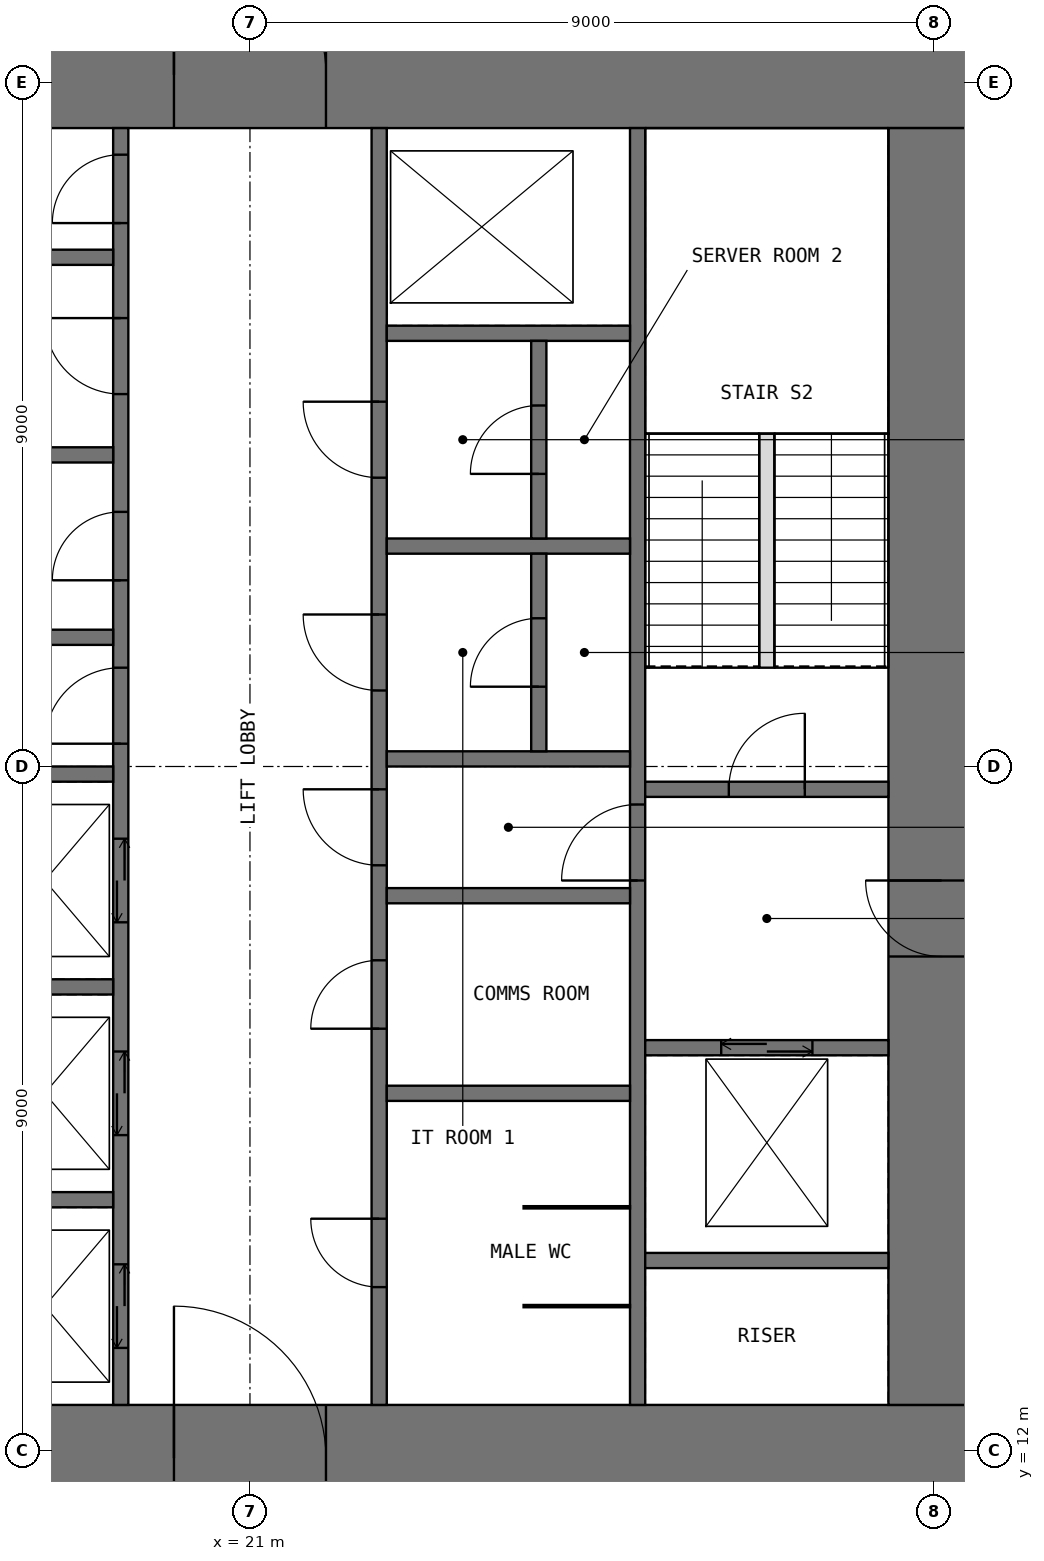
"""IFC4 building model, lengths in metres.
Left out: names, types, materials, properties, quantities, classifications, styles, units other than length and angle.
Written with IfcOpenShell. Run it as: python <this file> out.ifc"""

import sys

from ifc_helpers import new_model, si_unit, direction, frame, frame_2d, origin, place, context, subcontext, project, spatial, rectangle, extrude, element, fill, save


model = new_model("IFC4")
c1 = context("Model", 3, precision=1e-05, world=origin(), true_north=direction((0.0, 1.0)))
c2 = subcontext(c1, "Body", "Model", "MODEL_VIEW")
j1 = project(units=[si_unit("LENGTHUNIT", "METRE"), si_unit("PLANEANGLEUNIT", "RADIAN")], contexts=[c1])
p1 = place(None, origin())
s1 = spatial("IfcSite", under=j1, at=p1, CompositionType="ELEMENT")
p2 = place(p1, origin())
s2 = spatial("IfcBuilding", under=s1, at=p2, CompositionType="ELEMENT")
p3 = place(p2, frame((0.0, 0.0, 190.5)))
s3 = spatial("IfcBuildingStorey", under=s2, at=p3, CompositionType="ELEMENT", Elevation=190.5)
p4 = place(p3, frame((11.2, 11.9, -0.05), z_axis=(0.0, 0.0, 1.0), x_axis=(1.0, 0.0, 0.0)))
e1 = element("IfcWall", 1, at=p4, inside=s3, PredefinedType="SHEAR", context=c2, shape_type="SweptSolid", body=[
    extrude(rectangle(XDim=19.6, YDim=1.4, at=frame_2d((9.8, 0.0))), origin(), (0.0, 0.0, 1.0), 4.0),
])
p5 = place(p4, frame((8.8, 0.0, 0.05)))
e2 = element("IfcOpeningElement", 2, at=p5, cuts=e1, PredefinedType="OPENING", context=c2, shape_type="SweptSolid", body=[
    extrude(rectangle(XDim=2.0, YDim=2.2, at=frame_2d((1.0, 1.1))), frame((0.0, 0.71, 0.0), z_axis=(0.0, -1.0, 0.0), x_axis=(1.0, 0.0, 0.0)), (0.0, 0.0, 1.0), 1.42),
])
p6 = place(p3, frame((11.2, 30.1, -0.05), z_axis=(0.0, 0.0, 1.0), x_axis=(1.0, 0.0, 0.0)))
e3 = element("IfcWall", 3, at=p6, inside=s3, PredefinedType="SHEAR", context=c2, shape_type="SweptSolid", body=[
    extrude(rectangle(XDim=19.6, YDim=1.4, at=frame_2d((9.8, 0.0))), origin(), (0.0, 0.0, 1.0), 4.0),
])
p7 = place(p6, frame((8.8, 0.0, 0.05)))
e4 = element("IfcOpeningElement", 4, at=p7, cuts=e3, PredefinedType="OPENING", context=c2, shape_type="SweptSolid", body=[
    extrude(rectangle(XDim=2.0, YDim=2.2, at=frame_2d((1.0, 1.1))), frame((0.0, 0.71, 0.0), z_axis=(0.0, -1.0, 0.0), x_axis=(1.0, 0.0, 0.0)), (0.0, 0.0, 1.0), 1.42),
])
p8 = place(p3, frame((30.1, 12.6, -0.05), z_axis=(0.0, 0.0, 1.0), x_axis=(0.0, 1.0, 0.0)))
e5 = element("IfcWall", 5, at=p8, inside=s3, PredefinedType="SHEAR", context=c2, shape_type="SweptSolid", body=[
    extrude(rectangle(XDim=16.8, YDim=1.4, at=frame_2d((8.4, 0.0))), origin(), (0.0, 0.0, 1.0), 4.0),
])
p9 = place(p8, frame((5.9, 0.0, 0.05)))
e6 = element("IfcOpeningElement", 6, at=p9, cuts=e5, PredefinedType="OPENING", context=c2, shape_type="SweptSolid", body=[
    extrude(rectangle(XDim=1.0, YDim=2.2, at=frame_2d((0.5, 1.1))), frame((0.0, 0.71, 0.0), z_axis=(0.0, -1.0, 0.0), x_axis=(1.0, 0.0, 0.0)), (0.0, 0.0, 1.0), 1.42),
])
p10 = place(p3, frame((19.3, 12.6, -0.05), z_axis=(0.0, 0.0, 1.0), x_axis=(0.0, 1.0, 0.0)))
e7 = element("IfcWall", 7, at=p10, inside=s3, PredefinedType="SHEAR", context=c2, shape_type="SweptSolid", body=[
    extrude(rectangle(XDim=16.8, YDim=0.2, at=frame_2d((8.4, 0.0))), origin(), (0.0, 0.0, 1.0), 4.0),
])
p11 = place(p10, frame((8.7, 0.0, 0.05)))
e8 = element("IfcOpeningElement", 8, at=p11, cuts=e7, PredefinedType="OPENING", context=c2, shape_type="SweptSolid", body=[
    extrude(rectangle(XDim=1.0, YDim=2.2, at=frame_2d((0.5, 1.1))), frame((0.0, 0.11, 0.0), z_axis=(0.0, -1.0, 0.0), x_axis=(1.0, 0.0, 0.0)), (0.0, 0.0, 1.0), 0.22),
])
p12 = place(p10, frame((10.85, 0.0, 0.05)))
e9 = element("IfcOpeningElement", 9, at=p12, cuts=e7, PredefinedType="OPENING", context=c2, shape_type="SweptSolid", body=[
    extrude(rectangle(XDim=0.9, YDim=2.2, at=frame_2d((0.45, 1.1))), frame((0.0, 0.11, 0.0), z_axis=(0.0, -1.0, 0.0), x_axis=(1.0, 0.0, 0.0)), (0.0, 0.0, 1.0), 0.22),
])
p13 = place(p10, frame((13.3, 0.0, 0.05)))
e10 = element("IfcOpeningElement", 10, at=p13, cuts=e7, PredefinedType="OPENING", context=c2, shape_type="SweptSolid", body=[
    extrude(rectangle(XDim=1.0, YDim=2.2, at=frame_2d((0.5, 1.1))), frame((0.0, 0.11, 0.0), z_axis=(0.0, -1.0, 0.0), x_axis=(1.0, 0.0, 0.0)), (0.0, 0.0, 1.0), 0.22),
])
p14 = place(p10, frame((15.55, 0.0, 0.05)))
e11 = element("IfcOpeningElement", 11, at=p14, cuts=e7, PredefinedType="OPENING", context=c2, shape_type="SweptSolid", body=[
    extrude(rectangle(XDim=0.9, YDim=2.2, at=frame_2d((0.45, 1.1))), frame((0.0, 0.11, 0.0), z_axis=(0.0, -1.0, 0.0), x_axis=(1.0, 0.0, 0.0)), (0.0, 0.0, 1.0), 0.22),
])
p15 = place(p10, frame((0.75, 0.0, 0.05)))
e12 = element("IfcOpeningElement", 12, at=p15, cuts=e7, PredefinedType="OPENING", context=c2, shape_type="SweptSolid", body=[
    extrude(rectangle(XDim=1.1, YDim=2.2, at=frame_2d((0.55, 1.1))), frame((0.0, 0.11, 0.0), z_axis=(0.0, -1.0, 0.0), x_axis=(1.0, 0.0, 0.0)), (0.0, 0.0, 1.0), 0.22),
])
p16 = place(p10, frame((3.55, 0.0, 0.05)))
e13 = element("IfcOpeningElement", 13, at=p16, cuts=e7, PredefinedType="OPENING", context=c2, shape_type="SweptSolid", body=[
    extrude(rectangle(XDim=1.1, YDim=2.2, at=frame_2d((0.55, 1.1))), frame((0.0, 0.11, 0.0), z_axis=(0.0, -1.0, 0.0), x_axis=(1.0, 0.0, 0.0)), (0.0, 0.0, 1.0), 0.22),
])
p17 = place(p10, frame((6.35, 0.0, 0.05)))
e14 = element("IfcOpeningElement", 14, at=p17, cuts=e7, PredefinedType="OPENING", context=c2, shape_type="SweptSolid", body=[
    extrude(rectangle(XDim=1.1, YDim=2.2, at=frame_2d((0.55, 1.1))), frame((0.0, 0.11, 0.0), z_axis=(0.0, -1.0, 0.0), x_axis=(1.0, 0.0, 0.0)), (0.0, 0.0, 1.0), 0.22),
])
p18 = place(p3, frame((22.7, 12.6, -0.05), z_axis=(0.0, 0.0, 1.0), x_axis=(0.0, 1.0, 0.0)))
e15 = element("IfcWall", 15, at=p18, inside=s3, PredefinedType="SHEAR", context=c2, shape_type="SweptSolid", body=[
    extrude(rectangle(XDim=16.8, YDim=0.2, at=frame_2d((8.4, 0.0))), origin(), (0.0, 0.0, 1.0), 4.0),
])
p19 = place(p18, frame((7.1, 0.0, 0.05)))
e16 = element("IfcOpeningElement", 16, at=p19, cuts=e15, PredefinedType="OPENING", context=c2, shape_type="SweptSolid", body=[
    extrude(rectangle(XDim=1.0, YDim=2.2, at=frame_2d((0.5, 1.1))), frame((0.0, 0.11, 0.0), z_axis=(0.0, -1.0, 0.0), x_axis=(1.0, 0.0, 0.0)), (0.0, 0.0, 1.0), 0.22),
])
p20 = place(p18, frame((1.55, 0.0, 0.05)))
e17 = element("IfcOpeningElement", 17, at=p20, cuts=e15, PredefinedType="OPENING", context=c2, shape_type="SweptSolid", body=[
    extrude(rectangle(XDim=0.9, YDim=2.2, at=frame_2d((0.45, 1.1))), frame((0.0, 0.11, 0.0), z_axis=(0.0, -1.0, 0.0), x_axis=(1.0, 0.0, 0.0)), (0.0, 0.0, 1.0), 0.22),
])
p21 = place(p18, frame((4.95, 0.0, 0.05)))
e18 = element("IfcOpeningElement", 18, at=p21, cuts=e15, PredefinedType="OPENING", context=c2, shape_type="SweptSolid", body=[
    extrude(rectangle(XDim=0.9, YDim=2.2, at=frame_2d((0.45, 1.1))), frame((0.0, 0.11, 0.0), z_axis=(0.0, -1.0, 0.0), x_axis=(1.0, 0.0, 0.0)), (0.0, 0.0, 1.0), 0.22),
])
p22 = place(p18, frame((9.4, 0.0, 0.05)))
e19 = element("IfcOpeningElement", 19, at=p22, cuts=e15, PredefinedType="OPENING", context=c2, shape_type="SweptSolid", body=[
    extrude(rectangle(XDim=1.0, YDim=2.2, at=frame_2d((0.5, 1.1))), frame((0.0, 0.11, 0.0), z_axis=(0.0, -1.0, 0.0), x_axis=(1.0, 0.0, 0.0)), (0.0, 0.0, 1.0), 0.22),
])
p23 = place(p18, frame((12.2, 0.0, 0.05)))
e20 = element("IfcOpeningElement", 20, at=p23, cuts=e15, PredefinedType="OPENING", context=c2, shape_type="SweptSolid", body=[
    extrude(rectangle(XDim=1.0, YDim=2.2, at=frame_2d((0.5, 1.1))), frame((0.0, 0.11, 0.0), z_axis=(0.0, -1.0, 0.0), x_axis=(1.0, 0.0, 0.0)), (0.0, 0.0, 1.0), 0.22),
])
p24 = place(p3, frame((26.1, 12.6, -0.05), z_axis=(0.0, 0.0, 1.0), x_axis=(0.0, 1.0, 0.0)))
e21 = element("IfcWall", 21, at=p24, inside=s3, PredefinedType="SHEAR", context=c2, shape_type="SweptSolid", body=[
    extrude(rectangle(XDim=16.8, YDim=0.2, at=frame_2d((8.4, 0.0))), origin(), (0.0, 0.0, 1.0), 4.0),
])
p25 = place(p24, frame((6.9, 0.0, 0.05)))
e22 = element("IfcOpeningElement", 22, at=p25, cuts=e21, PredefinedType="OPENING", context=c2, shape_type="SweptSolid", body=[
    extrude(rectangle(XDim=1.0, YDim=2.2, at=frame_2d((0.5, 1.1))), frame((0.0, 0.11, 0.0), z_axis=(0.0, -1.0, 0.0), x_axis=(1.0, 0.0, 0.0)), (0.0, 0.0, 1.0), 0.22),
])
for number, where, z_axis, x_axis in (
    (23, (16.0, 15.3, -0.05), (0.0, 0.0, 1.0), (1.0, 0.0, 0.0)),
    (24, (16.0, 18.1, -0.05), (0.0, 0.0, 1.0), (1.0, 0.0, 0.0)),
    (25, (16.0, 20.9, -0.05), (0.0, 0.0, 1.0), (1.0, 0.0, 0.0)),
    (26, (16.0, 22.7, -0.05), (0.0, 0.0, 1.0), (1.0, 0.0, 0.0)),
    (27, (16.0, 25.1, -0.05), (0.0, 0.0, 1.0), (1.0, 0.0, 0.0)),
    (28, (16.0, 27.7, -0.05), (0.0, 0.0, 1.0), (1.0, 0.0, 0.0)),
    (29, (22.8, 16.7, -0.05), (0.0, 0.0, 1.0), (1.0, 0.0, 0.0)),
    (30, (22.8, 19.3, -0.05), (0.0, 0.0, 1.0), (1.0, 0.0, 0.0)),
    (31, (22.8, 21.1, -0.05), (0.0, 0.0, 1.0), (1.0, 0.0, 0.0)),
    (32, (22.8, 23.9, -0.05), (0.0, 0.0, 1.0), (1.0, 0.0, 0.0)),
    (33, (22.8, 26.7, -0.05), (0.0, 0.0, 1.0), (1.0, 0.0, 0.0)),
    (34, (26.2, 14.5, -0.05), (0.0, 0.0, 1.0), (1.0, 0.0, 0.0)),
):
    element("IfcWall", number, at=place(p3, frame(where, z_axis=z_axis, x_axis=x_axis)), inside=s3, PredefinedType="SHEAR", context=c2, shape_type="SweptSolid", body=[
        extrude(rectangle(XDim=3.2, YDim=0.2, at=frame_2d((1.6, 0.0))), origin(), (0.0, 0.0, 1.0), 4.0),
    ])
p26 = place(p3, frame((26.2, 17.3, -0.05), z_axis=(0.0, 0.0, 1.0), x_axis=(1.0, 0.0, 0.0)))
e35 = element("IfcWall", 35, at=p26, inside=s3, PredefinedType="SHEAR", context=c2, shape_type="SweptSolid", body=[
    extrude(rectangle(XDim=3.2, YDim=0.2, at=frame_2d((1.6, 0.0))), origin(), (0.0, 0.0, 1.0), 4.0),
])
p27 = place(p26, frame((1.0, 0.0, 0.05)))
e36 = element("IfcOpeningElement", 36, at=p27, cuts=e35, PredefinedType="OPENING", context=c2, shape_type="SweptSolid", body=[
    extrude(rectangle(XDim=1.2, YDim=2.2, at=frame_2d((0.6, 1.1))), frame((0.0, 0.11, 0.0), z_axis=(0.0, -1.0, 0.0), x_axis=(1.0, 0.0, 0.0)), (0.0, 0.0, 1.0), 0.22),
])
p28 = place(p3, frame((26.2, 20.7, -0.05), z_axis=(0.0, 0.0, 1.0), x_axis=(1.0, 0.0, 0.0)))
e37 = element("IfcWall", 37, at=p28, inside=s3, PredefinedType="SHEAR", context=c2, shape_type="SweptSolid", body=[
    extrude(rectangle(XDim=3.2, YDim=0.2, at=frame_2d((1.6, 0.0))), origin(), (0.0, 0.0, 1.0), 4.0),
])
p29 = place(p28, frame((1.1, 0.0, 0.05)))
e38 = element("IfcOpeningElement", 38, at=p29, cuts=e37, PredefinedType="OPENING", context=c2, shape_type="SweptSolid", body=[
    extrude(rectangle(XDim=1.0, YDim=2.2, at=frame_2d((0.5, 1.1))), frame((0.0, 0.11, 0.0), z_axis=(0.0, -1.0, 0.0), x_axis=(1.0, 0.0, 0.0)), (0.0, 0.0, 1.0), 0.22),
])
for number, where, z_axis, x_axis in (
    (39, (24.6, 13.9, 0.0), (0.0, 0.0, 1.0), (1.0, 0.0, 0.0)),
    (40, (24.6, 15.2, 0.0), (0.0, 0.0, 1.0), (1.0, 0.0, 0.0)),
):
    element("IfcWall", number, at=place(p3, frame(where, z_axis=z_axis, x_axis=x_axis)), inside=s3, PredefinedType="PARTITIONING", context=c2, shape_type="SweptSolid", body=[
        extrude(rectangle(XDim=1.4, YDim=0.03, at=frame_2d((0.7, 0.0))), origin(), (0.0, 0.0, 1.0), 3.75),
    ])
p30 = place(p3, frame((24.8, 21.2, -0.05), z_axis=(0.0, 0.0, 1.0), x_axis=(0.0, 1.0, 0.0)))
e41 = element("IfcWall", 41, at=p30, inside=s3, PredefinedType="SHEAR", context=c2, shape_type="SweptSolid", body=[
    extrude(rectangle(XDim=2.6, YDim=0.2, at=frame_2d((1.3, 0.0))), origin(), (0.0, 0.0, 1.0), 4.0),
])
p31 = place(p30, frame((0.85, 0.0, 0.05)))
e42 = element("IfcOpeningElement", 42, at=p31, cuts=e41, PredefinedType="OPENING", context=c2, shape_type="SweptSolid", body=[
    extrude(rectangle(XDim=0.9, YDim=2.2, at=frame_2d((0.45, 1.1))), frame((0.0, 0.11, 0.0), z_axis=(0.0, -1.0, 0.0), x_axis=(1.0, 0.0, 0.0)), (0.0, 0.0, 1.0), 0.22),
])
p32 = place(p3, frame((24.8, 24.0, -0.05), z_axis=(0.0, 0.0, 1.0), x_axis=(0.0, 1.0, 0.0)))
e43 = element("IfcWall", 43, at=p32, inside=s3, PredefinedType="SHEAR", context=c2, shape_type="SweptSolid", body=[
    extrude(rectangle(XDim=2.6, YDim=0.2, at=frame_2d((1.3, 0.0))), origin(), (0.0, 0.0, 1.0), 4.0),
])
p33 = place(p32, frame((0.85, 0.0, 0.05)))
e44 = element("IfcOpeningElement", 44, at=p33, cuts=e43, PredefinedType="OPENING", context=c2, shape_type="SweptSolid", body=[
    extrude(rectangle(XDim=0.9, YDim=2.2, at=frame_2d((0.45, 1.1))), frame((0.0, 0.11, 0.0), z_axis=(0.0, -1.0, 0.0), x_axis=(1.0, 0.0, 0.0)), (0.0, 0.0, 1.0), 0.22),
])
p34 = place(p3, frame((27.8, 22.3, 0.0), z_axis=(0.0, 0.0, 1.0), x_axis=(0.0, 1.0, 0.0)))
e45 = element("IfcWall", 45, at=p34, inside=s3, PredefinedType="PARTITIONING", context=c2, shape_type="SweptSolid", body=[
    extrude(rectangle(XDim=3.08, YDim=0.2, at=frame_2d((1.54, 0.0))), origin(), (0.0, 0.0, 1.0), 4.0),
])
p35 = place(p5, origin())
e46 = element("IfcDoor", 46, at=p35, inside=s3, OperationType="DOUBLE_DOOR_SINGLE_SWING", PredefinedType="DOOR", context=c2, shape_type="SweptSolid", body=[
    extrude(rectangle(XDim=2.0, YDim=2.2, at=frame_2d((1.0, 1.1))), frame((0.0, 0.025, 0.0), z_axis=(0.0, -1.0, 0.0), x_axis=(1.0, 0.0, 0.0)), (0.0, 0.0, 1.0), 0.05),
])
fill(e2, e46)
p36 = place(p7, origin())
e47 = element("IfcDoor", 47, at=p36, inside=s3, OperationType="DOUBLE_DOOR_SINGLE_SWING", PredefinedType="DOOR", context=c2, shape_type="SweptSolid", body=[
    extrude(rectangle(XDim=2.0, YDim=2.2, at=frame_2d((1.0, 1.1))), frame((0.0, 0.025, 0.0), z_axis=(0.0, -1.0, 0.0), x_axis=(1.0, 0.0, 0.0)), (0.0, 0.0, 1.0), 0.05),
])
fill(e4, e47)
p37 = place(p9, origin())
e48 = element("IfcDoor", 48, at=p37, inside=s3, OperationType="SINGLE_SWING_RIGHT", PredefinedType="DOOR", context=c2, shape_type="SweptSolid", body=[
    extrude(rectangle(XDim=1.0, YDim=2.2, at=frame_2d((0.5, 1.1))), frame((0.0, 0.025, 0.0), z_axis=(0.0, -1.0, 0.0), x_axis=(1.0, 0.0, 0.0)), (0.0, 0.0, 1.0), 0.05),
])
fill(e6, e48)
p38 = place(p29, origin())
e49 = element("IfcDoor", 49, at=p38, inside=s3, OperationType="SINGLE_SWING_RIGHT", PredefinedType="DOOR", context=c2, shape_type="SweptSolid", body=[
    extrude(rectangle(XDim=1.0, YDim=2.2, at=frame_2d((0.5, 1.1))), frame((0.0, 0.025, 0.0), z_axis=(0.0, -1.0, 0.0), x_axis=(1.0, 0.0, 0.0)), (0.0, 0.0, 1.0), 0.05),
])
fill(e38, e49)
p39 = place(p25, origin())
e50 = element("IfcDoor", 50, at=p39, inside=s3, OperationType="SINGLE_SWING_LEFT", PredefinedType="DOOR", context=c2, shape_type="SweptSolid", body=[
    extrude(rectangle(XDim=1.0, YDim=2.2, at=frame_2d((0.5, 1.1))), frame((0.0, 0.025, 0.0), z_axis=(0.0, -1.0, 0.0), x_axis=(1.0, 0.0, 0.0)), (0.0, 0.0, 1.0), 0.05),
])
fill(e22, e50)
p40 = place(p11, origin())
e51 = element("IfcDoor", 51, at=p40, inside=s3, OperationType="SINGLE_SWING_LEFT", PredefinedType="DOOR", context=c2, shape_type="SweptSolid", body=[
    extrude(rectangle(XDim=1.0, YDim=2.2, at=frame_2d((0.5, 1.1))), frame((0.0, 0.025, 0.0), z_axis=(0.0, -1.0, 0.0), x_axis=(1.0, 0.0, 0.0)), (0.0, 0.0, 1.0), 0.05),
])
fill(e8, e51)
p41 = place(p19, origin())
e52 = element("IfcDoor", 52, at=p41, inside=s3, OperationType="SINGLE_SWING_RIGHT", PredefinedType="DOOR", context=c2, shape_type="SweptSolid", body=[
    extrude(rectangle(XDim=1.0, YDim=2.2, at=frame_2d((0.5, 1.1))), frame((0.0, 0.025, 0.0), z_axis=(0.0, -1.0, 0.0), x_axis=(1.0, 0.0, 0.0)), (0.0, 0.0, 1.0), 0.05),
])
fill(e16, e52)
p42 = place(p12, origin())
e53 = element("IfcDoor", 53, at=p42, inside=s3, OperationType="SINGLE_SWING_LEFT", PredefinedType="DOOR", context=c2, shape_type="SweptSolid", body=[
    extrude(rectangle(XDim=0.9, YDim=2.2, at=frame_2d((0.45, 1.1))), frame((0.0, 0.025, 0.0), z_axis=(0.0, -1.0, 0.0), x_axis=(1.0, 0.0, 0.0)), (0.0, 0.0, 1.0), 0.05),
])
fill(e9, e53)
p43 = place(p13, origin())
e54 = element("IfcDoor", 54, at=p43, inside=s3, OperationType="SINGLE_SWING_RIGHT", PredefinedType="DOOR", context=c2, shape_type="SweptSolid", body=[
    extrude(rectangle(XDim=1.0, YDim=2.2, at=frame_2d((0.5, 1.1))), frame((0.0, 0.025, 0.0), z_axis=(0.0, -1.0, 0.0), x_axis=(1.0, 0.0, 0.0)), (0.0, 0.0, 1.0), 0.05),
])
fill(e10, e54)
p44 = place(p14, origin())
e55 = element("IfcDoor", 55, at=p44, inside=s3, OperationType="SINGLE_SWING_LEFT", PredefinedType="DOOR", context=c2, shape_type="SweptSolid", body=[
    extrude(rectangle(XDim=0.9, YDim=2.2, at=frame_2d((0.45, 1.1))), frame((0.0, 0.025, 0.0), z_axis=(0.0, -1.0, 0.0), x_axis=(1.0, 0.0, 0.0)), (0.0, 0.0, 1.0), 0.05),
])
fill(e11, e55)
p45 = place(p20, origin())
e56 = element("IfcDoor", 56, at=p45, inside=s3, OperationType="SINGLE_SWING_RIGHT", PredefinedType="DOOR", context=c2, shape_type="SweptSolid", body=[
    extrude(rectangle(XDim=0.9, YDim=2.2, at=frame_2d((0.45, 1.1))), frame((0.0, 0.025, 0.0), z_axis=(0.0, -1.0, 0.0), x_axis=(1.0, 0.0, 0.0)), (0.0, 0.0, 1.0), 0.05),
])
fill(e17, e56)
p46 = place(p21, origin())
e57 = element("IfcDoor", 57, at=p46, inside=s3, OperationType="SINGLE_SWING_LEFT", PredefinedType="DOOR", context=c2, shape_type="SweptSolid", body=[
    extrude(rectangle(XDim=0.9, YDim=2.2, at=frame_2d((0.45, 1.1))), frame((0.0, 0.025, 0.0), z_axis=(0.0, -1.0, 0.0), x_axis=(1.0, 0.0, 0.0)), (0.0, 0.0, 1.0), 0.05),
])
fill(e18, e57)
p47 = place(p22, origin())
e58 = element("IfcDoor", 58, at=p47, inside=s3, OperationType="SINGLE_SWING_RIGHT", PredefinedType="DOOR", context=c2, shape_type="SweptSolid", body=[
    extrude(rectangle(XDim=1.0, YDim=2.2, at=frame_2d((0.5, 1.1))), frame((0.0, 0.025, 0.0), z_axis=(0.0, -1.0, 0.0), x_axis=(1.0, 0.0, 0.0)), (0.0, 0.0, 1.0), 0.05),
])
fill(e19, e58)
p48 = place(p31, origin())
e59 = element("IfcDoor", 59, at=p48, inside=s3, OperationType="SINGLE_SWING_LEFT", PredefinedType="DOOR", context=c2, shape_type="SweptSolid", body=[
    extrude(rectangle(XDim=0.9, YDim=2.2, at=frame_2d((0.45, 1.1))), frame((0.0, 0.025, 0.0), z_axis=(0.0, -1.0, 0.0), x_axis=(1.0, 0.0, 0.0)), (0.0, 0.0, 1.0), 0.05),
])
fill(e42, e59)
p49 = place(p23, origin())
e60 = element("IfcDoor", 60, at=p49, inside=s3, OperationType="SINGLE_SWING_RIGHT", PredefinedType="DOOR", context=c2, shape_type="SweptSolid", body=[
    extrude(rectangle(XDim=1.0, YDim=2.2, at=frame_2d((0.5, 1.1))), frame((0.0, 0.025, 0.0), z_axis=(0.0, -1.0, 0.0), x_axis=(1.0, 0.0, 0.0)), (0.0, 0.0, 1.0), 0.05),
])
fill(e20, e60)
p50 = place(p33, origin())
e61 = element("IfcDoor", 61, at=p50, inside=s3, OperationType="SINGLE_SWING_LEFT", PredefinedType="DOOR", context=c2, shape_type="SweptSolid", body=[
    extrude(rectangle(XDim=0.9, YDim=2.2, at=frame_2d((0.45, 1.1))), frame((0.0, 0.025, 0.0), z_axis=(0.0, -1.0, 0.0), x_axis=(1.0, 0.0, 0.0)), (0.0, 0.0, 1.0), 0.05),
])
fill(e44, e61)
p51 = place(p15, origin())
e62 = element("IfcDoor", 62, at=p51, inside=s3, OperationType="DOUBLE_DOOR_SLIDING", PredefinedType="DOOR", context=c2, shape_type="SweptSolid", body=[
    extrude(rectangle(XDim=1.1, YDim=2.2, at=frame_2d((0.55, 1.1))), frame((0.0, 0.025, 0.0), z_axis=(0.0, -1.0, 0.0), x_axis=(1.0, 0.0, 0.0)), (0.0, 0.0, 1.0), 0.05),
])
fill(e12, e62)
p52 = place(p16, origin())
e63 = element("IfcDoor", 63, at=p52, inside=s3, OperationType="DOUBLE_DOOR_SLIDING", PredefinedType="DOOR", context=c2, shape_type="SweptSolid", body=[
    extrude(rectangle(XDim=1.1, YDim=2.2, at=frame_2d((0.55, 1.1))), frame((0.0, 0.025, 0.0), z_axis=(0.0, -1.0, 0.0), x_axis=(1.0, 0.0, 0.0)), (0.0, 0.0, 1.0), 0.05),
])
fill(e13, e63)
p53 = place(p17, origin())
e64 = element("IfcDoor", 64, at=p53, inside=s3, OperationType="DOUBLE_DOOR_SLIDING", PredefinedType="DOOR", context=c2, shape_type="SweptSolid", body=[
    extrude(rectangle(XDim=1.1, YDim=2.2, at=frame_2d((0.55, 1.1))), frame((0.0, 0.025, 0.0), z_axis=(0.0, -1.0, 0.0), x_axis=(1.0, 0.0, 0.0)), (0.0, 0.0, 1.0), 0.05),
])
fill(e14, e64)
p54 = place(p27, origin())
e65 = element("IfcDoor", 65, at=p54, inside=s3, OperationType="DOUBLE_DOOR_SLIDING", PredefinedType="DOOR", context=c2, shape_type="SweptSolid", body=[
    extrude(rectangle(XDim=1.2, YDim=2.2, at=frame_2d((0.6, 1.1))), frame((0.0, 0.025, 0.0), z_axis=(0.0, -1.0, 0.0), x_axis=(1.0, 0.0, 0.0)), (0.0, 0.0, 1.0), 0.05),
])
fill(e36, e65)
save(model, sys.argv[1])
